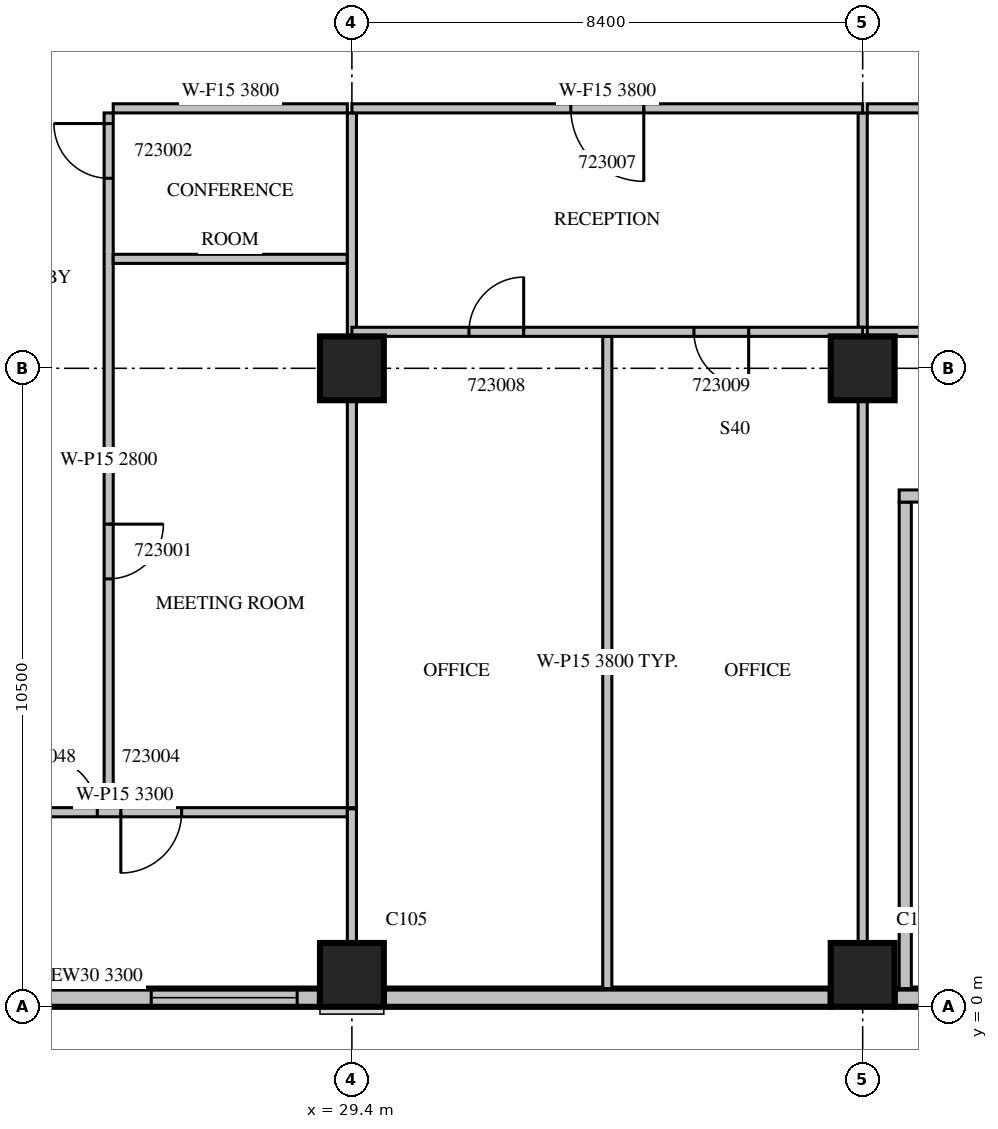
"""IFC4 building model, lengths in metres.
Left out: names, types, materials, properties, quantities, classifications, styles, units other than length and angle.
Written with IfcOpenShell. Run it as: python <this file> out.ifc"""

import sys

from ifc_helpers import new_model, si_unit, direction, frame, frame_2d, origin, origin_2d, place, context, subcontext, project, spatial, rectangle, extrude, source, transform, mapped, element, fill, save


model = new_model("IFC4")
c1 = context("Model", 3, precision=1e-05, world=origin(), true_north=direction((0.0, 1.0)))
c2 = subcontext(c1, "Body", "Model", "MODEL_VIEW")
j1 = project(units=[si_unit("LENGTHUNIT", "METRE"), si_unit("PLANEANGLEUNIT", "RADIAN")], contexts=[c1])
p1 = place(None, origin())
s1 = spatial("IfcSite", under=j1, at=p1, CompositionType="ELEMENT")
p2 = place(p1, origin())
s2 = spatial("IfcBuilding", under=s1, at=p2, CompositionType="ELEMENT")
p3 = place(p2, frame((0.0, 0.0, 107.7)))
s3 = spatial("IfcBuildingStorey", under=s2, at=p3, CompositionType="ELEMENT", Elevation=107.7)
m1 = source(origin(), c2, "Body", "SweptSolid", [
    extrude(rectangle(XDim=1.05, YDim=1.05, at=origin_2d()), origin(), (0.0, 0.0, 1.0), 4.2),
])
for number, where, z_axis, x_axis in (
    (1, (29.4, 0.525, 0.0), (0.0, 0.0, 1.0), (1.0, 0.0, 0.0)),
    (2, (37.8, 0.525, 0.0), (0.0, 0.0, 1.0), (1.0, 0.0, 0.0)),
    (3, (29.4, 10.5, 0.0), (0.0, 0.0, 1.0), (1.0, 0.0, 0.0)),
    (4, (37.8, 10.5, 0.0), (0.0, 0.0, 1.0), (1.0, 0.0, 0.0)),
):
    element("IfcColumn", number, at=place(p3, frame(where, z_axis=z_axis, x_axis=x_axis)), inside=s3, PredefinedType="COLUMN", context=c2, shape_type="MappedRepresentation", body=[
        mapped(m1, transform((0.0, 0.0, 0.0), scale=1.0)),
    ])
m2 = source(origin(), c2, "Body", "SweptSolid", [
    extrude(rectangle(XDim=7.35, YDim=0.3, at=frame_2d((3.675, 0.0))), origin(), (0.0, 0.0, 1.0), 3.3),
])
p4 = place(p3, frame((21.525, 0.15, 0.0), z_axis=(0.0, 0.0, 1.0), x_axis=(1.0, 0.0, 0.0)))
e5 = element("IfcWall", 5, at=p4, inside=s3, PredefinedType="STANDARD", context=c2, shape_type="MappedRepresentation", body=[
    mapped(m2, transform((0.0, 0.0, 0.0), scale=1.0)),
])
m3 = source(origin(), c2, "Body", "SweptSolid", [
    extrude(rectangle(XDim=2.4, YDim=2.7, at=frame_2d((1.2, 1.35))), frame((0.0, 0.16, 0.0), z_axis=(0.0, -1.0, 0.0), x_axis=(1.0, 0.0, 0.0)), (0.0, 0.0, 1.0), 0.32),
])
p5 = place(p4, frame((0.375, 0.0, 0.6)))
e6 = element("IfcOpeningElement", 6, at=p5, cuts=e5, PredefinedType="OPENING", context=c2, shape_type="MappedRepresentation", body=[
    mapped(m3, transform((0.0, 0.0, 0.0), scale=1.0)),
])
p6 = place(p4, frame((4.575, 0.0, 0.6)))
e7 = element("IfcOpeningElement", 7, at=p6, cuts=e5, PredefinedType="OPENING", context=c2, shape_type="MappedRepresentation", body=[
    mapped(m3, transform((0.0, 0.0, 0.0), scale=1.0)),
])
m4 = source(origin(), c2, "Body", "SweptSolid", [
    extrude(rectangle(XDim=7.35, YDim=0.3, at=frame_2d((3.675, 0.0))), origin(), (0.0, 0.0, 1.0), 3.8),
])
p7 = place(p3, frame((29.925, 0.15, 0.0), z_axis=(0.0, 0.0, 1.0), x_axis=(1.0, 0.0, 0.0)))
e8 = element("IfcWall", 8, at=p7, inside=s3, PredefinedType="STANDARD", context=c2, shape_type="MappedRepresentation", body=[
    mapped(m4, transform((0.0, 0.0, 0.0), scale=1.0)),
])
p8 = place(p3, frame((38.325, 0.15, 0.0), z_axis=(0.0, 0.0, 1.0), x_axis=(1.0, 0.0, 0.0)))
e9 = element("IfcWall", 9, at=p8, inside=s3, PredefinedType="STANDARD", context=c2, shape_type="SweptSolid", body=[
    extrude(rectangle(XDim=1.875, YDim=0.3, at=frame_2d((0.938, 0.0))), origin(), (0.0, 0.0, 1.0), 3.8),
])
m5 = source(origin(), c2, "Body", "SweptSolid", [
    extrude(rectangle(XDim=8.0, YDim=0.2, at=frame_2d((4.0, 0.0))), origin(), (0.0, 0.0, 1.0), 3.8),
])
p9 = place(p3, frame((38.5, 0.3, 0.0), z_axis=(0.0, 0.0, 1.0), x_axis=(0.0, 1.0, 0.0)))
e10 = element("IfcWall", 10, at=p9, inside=s3, PredefinedType="PARTITIONING", context=c2, shape_type="MappedRepresentation", body=[
    mapped(m5, transform((0.0, 0.0, 0.0), scale=1.0)),
])
m6 = source(origin(), c2, "Body", "SweptSolid", [
    extrude(rectangle(XDim=5.45, YDim=0.2, at=frame_2d((2.725, 0.0))), origin(), (0.0, 0.0, 1.0), 3.8),
])
p10 = place(p3, frame((38.4, 8.4, 0.0), z_axis=(0.0, 0.0, 1.0), x_axis=(1.0, 0.0, 0.0)))
e11 = element("IfcWall", 11, at=p10, inside=s3, PredefinedType="PARTITIONING", context=c2, shape_type="MappedRepresentation", body=[
    mapped(m6, transform((0.0, 0.0, 0.0), scale=1.0)),
])
m7 = source(origin(), c2, "Body", "SweptSolid", [
    extrude(rectangle(XDim=1.2, YDim=2.1, at=frame_2d((0.6, 1.05))), frame((0.0, 0.11, 0.0), z_axis=(0.0, -1.0, 0.0), x_axis=(1.0, 0.0, 0.0)), (0.0, 0.0, 1.0), 0.22),
])
p11 = place(p10, frame((0.4, 0.0, 0.0)))
e12 = element("IfcOpeningElement", 12, at=p11, cuts=e11, PredefinedType="OPENING", context=c2, shape_type="MappedRepresentation", body=[
    mapped(m7, transform((0.0, 0.0, 0.0), scale=1.0)),
])
m8 = source(origin(), c2, "Body", "SweptSolid", [
    extrude(rectangle(XDim=0.9, YDim=2.1, at=frame_2d((0.45, 1.05))), frame((0.0, 0.11, 0.0), z_axis=(0.0, -1.0, 0.0), x_axis=(1.0, 0.0, 0.0)), (0.0, 0.0, 1.0), 0.22),
])
p12 = place(p10, frame((3.25, 0.0, 0.0)))
e13 = element("IfcOpeningElement", 13, at=p12, cuts=e11, PredefinedType="OPENING", context=c2, shape_type="MappedRepresentation", body=[
    mapped(m8, transform((0.0, 0.0, 0.0), scale=1.0)),
])
p13 = place(p3, frame((25.4, 14.7, 0.0), z_axis=(0.0, 0.0, 1.0), x_axis=(0.0, -1.0, 0.0)))
e14 = element("IfcWall", 14, at=p13, inside=s3, PredefinedType="PARTITIONING", context=c2, shape_type="SweptSolid", body=[
    extrude(rectangle(XDim=11.425, YDim=0.15, at=frame_2d((5.713, 0.0))), origin(), (0.0, 0.0, 1.0), 2.8),
])
m9 = source(origin(), c2, "Body", "SweptSolid", [
    extrude(rectangle(XDim=0.9, YDim=2.1, at=frame_2d((0.45, 1.05))), frame((0.0, 0.085, 0.0), z_axis=(0.0, -1.0, 0.0), x_axis=(1.0, 0.0, 0.0)), (0.0, 0.0, 1.0), 0.17),
])
p14 = place(p13, frame((6.763, 0.0, 0.0)))
e15 = element("IfcOpeningElement", 15, at=p14, cuts=e14, PredefinedType="OPENING", context=c2, shape_type="MappedRepresentation", body=[
    mapped(m9, transform((0.0, 0.0, 0.0), scale=1.0)),
])
p15 = place(p13, frame((0.175, 0.0, 0.0)))
e16 = element("IfcOpeningElement", 16, at=p15, cuts=e14, PredefinedType="OPENING", context=c2, shape_type="MappedRepresentation", body=[
    mapped(m9, transform((0.0, 0.0, 0.0), scale=1.0)),
])
m10 = source(origin(), c2, "Body", "SweptSolid", [
    extrude(rectangle(XDim=3.85, YDim=0.15, at=frame_2d((1.925, 0.0))), origin(), (0.0, 0.0, 1.0), 3.8),
])
for number, where, z_axis, x_axis in (
    (17, (29.325, 12.3, 0.0), (0.0, 0.0, 1.0), (-1.0, 0.0, 0.0)),
    (18, (29.325, 14.775, 0.0), (0.0, 0.0, 1.0), (-1.0, 0.0, 0.0)),
):
    element("IfcWall", number, at=place(p3, frame(where, z_axis=z_axis, x_axis=x_axis)), inside=s3, PredefinedType="PARTITIONING", context=c2, shape_type="MappedRepresentation", body=[
        mapped(m10, transform((0.0, 0.0, 0.0), scale=1.0)),
    ])
p16 = place(p3, frame((29.4, 3.275, 0.0), z_axis=(0.0, 0.0, 1.0), x_axis=(0.0, 1.0, 0.0)))
e19 = element("IfcWall", 19, at=p16, inside=s3, PredefinedType="PARTITIONING", context=c2, shape_type="SweptSolid", body=[
    extrude(rectangle(XDim=6.701, YDim=0.15, at=frame_2d((3.35, 0.0))), origin(), (0.0, 0.0, 1.0), 3.8),
])
p17 = place(p3, frame((29.4, 11.024, 0.0), z_axis=(0.0, 0.0, 1.0), x_axis=(0.0, 1.0, 0.0)))
e20 = element("IfcWall", 20, at=p17, inside=s3, PredefinedType="PARTITIONING", context=c2, shape_type="SweptSolid", body=[
    extrude(rectangle(XDim=3.676, YDim=0.15, at=frame_2d((1.838, 0.0))), origin(), (0.0, 0.0, 1.0), 3.8),
])
p18 = place(p3, frame((22.0, 3.2, 0.0), z_axis=(0.0, 0.0, 1.0), x_axis=(1.0, 0.0, 0.0)))
e21 = element("IfcWall", 21, at=p18, inside=s3, PredefinedType="PARTITIONING", context=c2, shape_type="SweptSolid", body=[
    extrude(rectangle(XDim=7.325, YDim=0.15, at=frame_2d((3.663, 0.0))), origin(), (0.0, 0.0, 1.0), 3.3),
])
m11 = source(origin(), c2, "Body", "SweptSolid", [
    extrude(rectangle(XDim=1.0, YDim=2.1, at=frame_2d((0.5, 1.05))), frame((0.0, 0.085, 0.0), z_axis=(0.0, -1.0, 0.0), x_axis=(1.0, 0.0, 0.0)), (0.0, 0.0, 1.0), 0.17),
])
p19 = place(p18, frame((3.6, 0.0, 0.0)))
e22 = element("IfcOpeningElement", 22, at=p19, cuts=e21, PredefinedType="OPENING", context=c2, shape_type="MappedRepresentation", body=[
    mapped(m11, transform((0.0, 0.0, 0.0), scale=1.0)),
])
p20 = place(p18, frame((2.313, 0.0, 0.0)))
e23 = element("IfcOpeningElement", 23, at=p20, cuts=e21, PredefinedType="OPENING", context=c2, shape_type="MappedRepresentation", body=[
    mapped(m9, transform((0.0, 0.0, 0.0), scale=1.0)),
])
m12 = source(origin(), c2, "Body", "SweptSolid", [
    extrude(rectangle(XDim=6.45, YDim=0.15, at=frame_2d((3.225, 0.0))), origin(), (0.0, 0.0, 1.0), 3.8),
])
p21 = place(p3, frame((37.875, 11.1, 0.0), z_axis=(0.0, 0.0, 1.0), x_axis=(1.0, 0.0, 0.0)))
e24 = element("IfcWall", 24, at=p21, inside=s3, PredefinedType="PARTITIONING", context=c2, shape_type="MappedRepresentation", body=[
    mapped(m12, transform((0.0, 0.0, 0.0), scale=1.0)),
])
p22 = place(p3, frame((44.325, 14.775, 0.0), z_axis=(0.0, 0.0, 1.0), x_axis=(-1.0, 0.0, 0.0)))
e25 = element("IfcWall", 25, at=p22, inside=s3, PredefinedType="PARTITIONING", context=c2, shape_type="MappedRepresentation", body=[
    mapped(m12, transform((0.0, 0.0, 0.0), scale=1.0)),
])
p23 = place(p22, frame((2.812, 0.0, 0.0)))
e26 = element("IfcOpeningElement", 26, at=p23, cuts=e25, PredefinedType="OPENING", context=c2, shape_type="MappedRepresentation", body=[
    mapped(m9, transform((0.0, 0.0, 0.0), scale=1.0)),
])
p24 = place(p3, frame((33.6, 0.3, 0.0), z_axis=(0.0, 0.0, 1.0), x_axis=(0.0, 1.0, 0.0)))
e27 = element("IfcWall", 27, at=p24, inside=s3, PredefinedType="PARTITIONING", context=c2, shape_type="SweptSolid", body=[
    extrude(rectangle(XDim=10.725, YDim=0.15, at=frame_2d((5.362, 0.0))), origin(), (0.0, 0.0, 1.0), 3.8),
])
p25 = place(p3, frame((29.4, 1.049, 0.0), z_axis=(0.0, 0.0, 1.0), x_axis=(0.0, 1.0, 0.0)))
e28 = element("IfcWall", 28, at=p25, inside=s3, PredefinedType="PARTITIONING", context=c2, shape_type="SweptSolid", body=[
    extrude(rectangle(XDim=2.206, YDim=0.15, at=frame_2d((1.103, 0.0))), origin(), (0.0, 0.0, 1.0), 3.8),
])
m13 = source(origin(), c2, "Body", "SweptSolid", [
    extrude(rectangle(XDim=8.927, YDim=0.15, at=frame_2d((4.463, 0.0))), origin(), (0.0, 0.0, 1.0), 3.8),
])
p26 = place(p3, frame((37.8, 1.049, 0.0), z_axis=(0.0, 0.0, 1.0), x_axis=(0.0, 1.0, 0.0)))
e29 = element("IfcWall", 29, at=p26, inside=s3, PredefinedType="PARTITIONING", context=c2, shape_type="MappedRepresentation", body=[
    mapped(m13, transform((0.0, 0.0, 0.0), scale=1.0)),
])
p27 = place(p3, frame((37.8, 11.175, 0.0), z_axis=(0.0, 0.0, 1.0), x_axis=(0.0, 1.0, 0.0)))
e30 = element("IfcWall", 30, at=p27, inside=s3, PredefinedType="PARTITIONING", context=c2, shape_type="SweptSolid", body=[
    extrude(rectangle(XDim=3.525, YDim=0.15, at=frame_2d((1.762, 0.0))), origin(), (0.0, 0.0, 1.0), 3.8),
])
m14 = source(origin(), c2, "Body", "SweptSolid", [
    extrude(rectangle(XDim=8.4, YDim=0.15, at=frame_2d((4.2, 0.0))), origin(), (0.0, 0.0, 1.0), 3.8),
])
p28 = place(p3, frame((37.8, 11.1, 0.0), z_axis=(0.0, 0.0, 1.0), x_axis=(-1.0, 0.0, 0.0)))
e31 = element("IfcWall", 31, at=p28, inside=s3, PredefinedType="PARTITIONING", context=c2, shape_type="MappedRepresentation", body=[
    mapped(m14, transform((0.0, 0.0, 0.0), scale=1.0)),
])
p29 = place(p28, frame((5.575, 0.0, 0.0)))
e32 = element("IfcOpeningElement", 32, at=p29, cuts=e31, PredefinedType="OPENING", context=c2, shape_type="MappedRepresentation", body=[
    mapped(m9, transform((0.0, 0.0, 0.0), scale=1.0)),
])
p30 = place(p28, frame((1.875, 0.0, 0.0)))
e33 = element("IfcOpeningElement", 33, at=p30, cuts=e31, PredefinedType="OPENING", context=c2, shape_type="MappedRepresentation", body=[
    mapped(m9, transform((0.0, 0.0, 0.0), scale=1.0)),
])
p31 = place(p3, frame((37.8, 14.775, 0.0), z_axis=(0.0, 0.0, 1.0), x_axis=(-1.0, 0.0, 0.0)))
e34 = element("IfcWall", 34, at=p31, inside=s3, PredefinedType="PARTITIONING", context=c2, shape_type="MappedRepresentation", body=[
    mapped(m14, transform((0.0, 0.0, 0.0), scale=1.0)),
])
m15 = source(origin(), c2, "Body", "SweptSolid", [
    extrude(rectangle(XDim=1.2, YDim=2.1, at=frame_2d((0.6, 1.05))), frame((0.0, 0.085, 0.0), z_axis=(0.0, -1.0, 0.0), x_axis=(1.0, 0.0, 0.0)), (0.0, 0.0, 1.0), 0.17),
])
p32 = place(p31, frame((3.6, 0.0, 0.0)))
e35 = element("IfcOpeningElement", 35, at=p32, cuts=e34, PredefinedType="OPENING", context=c2, shape_type="MappedRepresentation", body=[
    mapped(m15, transform((0.0, 0.0, 0.0), scale=1.0)),
])
m16 = source(origin(), c2, "Body", "SweptSolid", [
    extrude(rectangle(XDim=2.4, YDim=2.7, at=frame_2d((1.2, 1.35))), frame((0.0, 0.03, 0.0), z_axis=(0.0, -1.0, 0.0), x_axis=(1.0, 0.0, 0.0)), (0.0, 0.0, 1.0), 0.06),
])
p33 = place(p6, origin())
e36 = element("IfcWindow", 36, at=p33, inside=s3, PartitioningType="SINGLE_PANEL", PredefinedType="WINDOW", context=c2, shape_type="MappedRepresentation", body=[
    mapped(m16, transform((0.0, 0.0, 0.0), scale=1.0)),
])
fill(e7, e36)
m17 = source(origin(), c2, "Body", "SweptSolid", [
    extrude(rectangle(XDim=0.9, YDim=2.1, at=frame_2d((0.45, 1.05))), frame((0.0, 0.025, 0.0), z_axis=(0.0, -1.0, 0.0), x_axis=(1.0, 0.0, 0.0)), (0.0, 0.0, 1.0), 0.05),
])
p34 = place(p14, origin())
e37 = element("IfcDoor", 37, at=p34, inside=s3, OperationType="SINGLE_SWING_LEFT", PredefinedType="DOOR", context=c2, shape_type="MappedRepresentation", body=[
    mapped(m17, transform((0.0, 0.0, 0.0), scale=1.0)),
])
fill(e15, e37)
p35 = place(p15, origin())
e38 = element("IfcDoor", 38, at=p35, inside=s3, OperationType="SINGLE_SWING_RIGHT", PredefinedType="DOOR", context=c2, shape_type="MappedRepresentation", body=[
    mapped(m17, transform((0.0, 0.0, 0.0), scale=1.0)),
])
fill(e16, e38)
m18 = source(origin(), c2, "Body", "SweptSolid", [
    extrude(rectangle(XDim=1.0, YDim=2.1, at=frame_2d((0.5, 1.05))), frame((0.0, 0.025, 0.0), z_axis=(0.0, -1.0, 0.0), x_axis=(1.0, 0.0, 0.0)), (0.0, 0.0, 1.0), 0.05),
])
p36 = place(p19, origin())
e39 = element("IfcDoor", 39, at=p36, inside=s3, OperationType="SINGLE_SWING_RIGHT", PredefinedType="DOOR", context=c2, shape_type="MappedRepresentation", body=[
    mapped(m18, transform((0.0, 0.0, 0.0), scale=1.0)),
])
fill(e22, e39)
m19 = source(origin(), c2, "Body", "SweptSolid", [
    extrude(rectangle(XDim=1.2, YDim=2.1, at=frame_2d((0.6, 1.05))), frame((0.0, 0.025, 0.0), z_axis=(0.0, -1.0, 0.0), x_axis=(1.0, 0.0, 0.0)), (0.0, 0.0, 1.0), 0.05),
])
p37 = place(p32, origin())
e40 = element("IfcDoor", 40, at=p37, inside=s3, OperationType="SINGLE_SWING_LEFT", PredefinedType="DOOR", context=c2, shape_type="MappedRepresentation", body=[
    mapped(m19, transform((0.0, 0.0, 0.0), scale=1.0)),
])
fill(e35, e40)
p38 = place(p29, origin())
e41 = element("IfcDoor", 41, at=p38, inside=s3, OperationType="SINGLE_SWING_RIGHT", PredefinedType="DOOR", context=c2, shape_type="MappedRepresentation", body=[
    mapped(m17, transform((0.0, 0.0, 0.0), scale=1.0)),
])
fill(e32, e41)
p39 = place(p30, origin())
e42 = element("IfcDoor", 42, at=p39, inside=s3, OperationType="SINGLE_SWING_LEFT", PredefinedType="DOOR", context=c2, shape_type="MappedRepresentation", body=[
    mapped(m17, transform((0.0, 0.0, 0.0), scale=1.0)),
])
fill(e33, e42)
p40 = place(p20, origin())
e43 = element("IfcDoor", 43, at=p40, inside=s3, OperationType="SINGLE_SWING_LEFT", PredefinedType="DOOR", context=c2, shape_type="MappedRepresentation", body=[
    mapped(m17, transform((0.0, 0.0, 0.0), scale=1.0)),
])
fill(e23, e43)
save(model, sys.argv[1])
